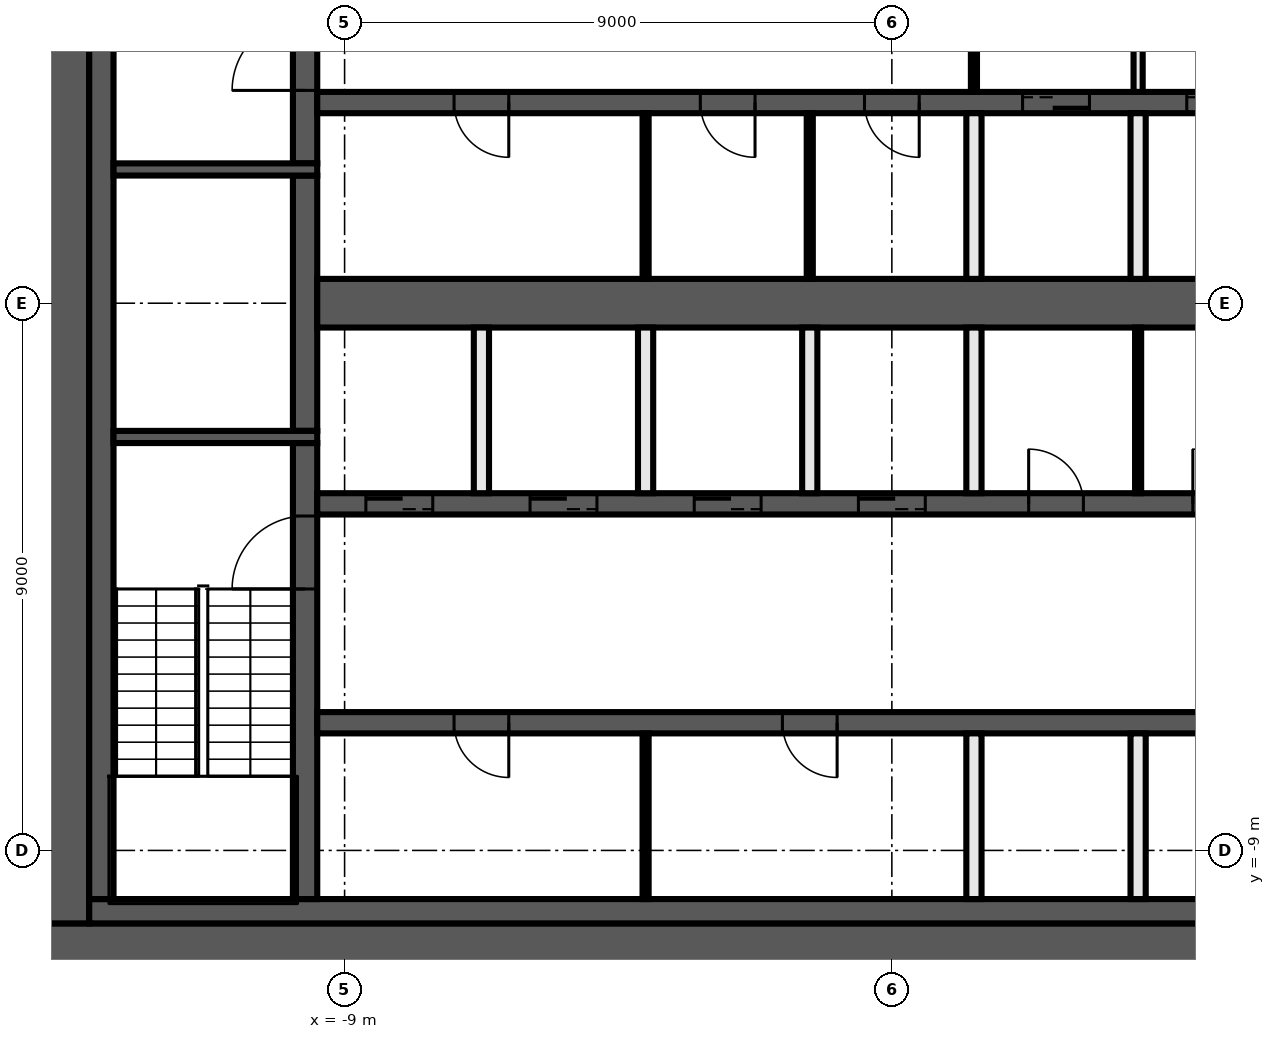
"""IFC4 building model, lengths in metres.
Left out: names, types, materials, properties, quantities, classifications, styles, units other than length and angle.
Written with IfcOpenShell. Run it as: python <this file> out.ifc"""

import sys

from ifc_helpers import new_model, si_unit, direction, frame, frame_2d, origin, place, context, subcontext, project, spatial, rectangle, extrude, element, fill, save


model = new_model("IFC4")
c1 = context("Model", 3, precision=1e-05, world=origin(), true_north=direction((0.0, 1.0)))
c2 = subcontext(c1, "Body", "Model", "MODEL_VIEW")
j1 = project(units=[si_unit("LENGTHUNIT", "METRE"), si_unit("PLANEANGLEUNIT", "RADIAN")], contexts=[c1])
p1 = place(None, origin())
s1 = spatial("IfcSite", under=j1, at=p1, CompositionType="ELEMENT")
p2 = place(p1, origin())
s2 = spatial("IfcBuilding", under=s1, at=p2, CompositionType="ELEMENT")
p3 = place(p2, frame((0.0, 0.0, 167.0)))
s3 = spatial("IfcBuildingStorey", under=s2, at=p3, CompositionType="ELEMENT", Elevation=167.0)
p4 = place(p3, frame((14.0, -10.6, 0.0), z_axis=(0.0, 0.0, 1.0), x_axis=(-1.0, 0.0, 0.0)))
e1 = element("IfcWall", 1, at=p4, inside=s3, PredefinedType="SHEAR", context=c2, shape_type="SweptSolid", body=[
    extrude(rectangle(XDim=28.0, YDim=0.8, at=frame_2d((14.0, 0.0))), origin(), (0.0, 0.0, 1.0), 3.82),
])
p5 = place(p4, frame((5.1, 0.0, 0.0)))
e2 = element("IfcOpeningElement", 2, at=p5, cuts=e1, PredefinedType="OPENING", context=c2, shape_type="SweptSolid", body=[
    extrude(rectangle(XDim=1.6, YDim=2.1, at=frame_2d((0.8, 1.05))), frame((0.0, 0.41, 0.0), z_axis=(0.0, -1.0, 0.0), x_axis=(1.0, 0.0, 0.0)), (0.0, 0.0, 1.0), 0.82),
])
p6 = place(p3, frame((-13.6, -10.2, 0.0), z_axis=(0.0, 0.0, 1.0), x_axis=(0.0, 1.0, 0.0)))
e3 = element("IfcWall", 3, at=p6, inside=s3, PredefinedType="SHEAR", context=c2, shape_type="SweptSolid", body=[
    extrude(rectangle(XDim=20.4, YDim=0.8, at=frame_2d((10.2, 0.0))), origin(), (0.0, 0.0, 1.0), 3.82),
])
p7 = place(p3, frame((6.9, -10.0, 0.0), z_axis=(0.0, 0.0, 1.0), x_axis=(-1.0, 0.0, 0.0)))
e4 = element("IfcWall", 4, at=p7, inside=s3, PredefinedType="SHEAR", context=c2, shape_type="SweptSolid", body=[
    extrude(rectangle(XDim=20.1, YDim=0.4, at=frame_2d((10.05, 0.0))), origin(), (0.0, 0.0, 1.0), 3.82),
])
p8 = place(p3, frame((-13.0, -9.8, 0.0), z_axis=(0.0, 0.0, 1.0), x_axis=(0.0, 1.0, 0.0)))
e5 = element("IfcWall", 5, at=p8, inside=s3, PredefinedType="SHEAR", context=c2, shape_type="SweptSolid", body=[
    extrude(rectangle(XDim=19.6, YDim=0.4, at=frame_2d((9.8, 0.0))), origin(), (0.0, 0.0, 1.0), 3.82),
])
p9 = place(p3, frame((-9.65, -9.8, 0.0), z_axis=(0.0, 0.0, 1.0), x_axis=(0.0, 1.0, 0.0)))
e6 = element("IfcWall", 6, at=p9, inside=s3, PredefinedType="SHEAR", context=c2, shape_type="SweptSolid", body=[
    extrude(rectangle(XDim=7.5, YDim=0.4, at=frame_2d((3.75, 0.0))), origin(), (0.0, 0.0, 1.0), 3.82),
])
p10 = place(p9, frame((5.1, 0.0, 0.0)))
e7 = element("IfcOpeningElement", 7, at=p10, cuts=e6, PredefinedType="OPENING", context=c2, shape_type="SweptSolid", body=[
    extrude(rectangle(XDim=1.2, YDim=2.1, at=frame_2d((0.6, 1.05))), frame((0.0, 0.21, 0.0), z_axis=(0.0, -1.0, 0.0), x_axis=(1.0, 0.0, 0.0)), (0.0, 0.0, 1.0), 0.42),
])
p11 = place(p3, frame((-9.65, -2.1, 0.0), z_axis=(0.0, 0.0, 1.0), x_axis=(0.0, 1.0, 0.0)))
e8 = element("IfcWall", 8, at=p11, inside=s3, PredefinedType="SHEAR", context=c2, shape_type="SweptSolid", body=[
    extrude(rectangle(XDim=4.2, YDim=0.4, at=frame_2d((2.1, 0.0))), origin(), (0.0, 0.0, 1.0), 3.82),
])
p12 = place(p3, frame((-9.65, 2.3, 0.0), z_axis=(0.0, 0.0, 1.0), x_axis=(0.0, 1.0, 0.0)))
e9 = element("IfcWall", 9, at=p12, inside=s3, PredefinedType="SHEAR", context=c2, shape_type="SweptSolid", body=[
    extrude(rectangle(XDim=7.5, YDim=0.4, at=frame_2d((3.75, 0.0))), origin(), (0.0, 0.0, 1.0), 3.82),
])
p13 = place(p12, frame((1.2, 0.0, 0.0)))
e10 = element("IfcOpeningElement", 10, at=p13, cuts=e9, PredefinedType="OPENING", context=c2, shape_type="SweptSolid", body=[
    extrude(rectangle(XDim=1.2, YDim=2.1, at=frame_2d((0.6, 1.05))), frame((0.0, 0.21, 0.0), z_axis=(0.0, -1.0, 0.0), x_axis=(1.0, 0.0, 0.0)), (0.0, 0.0, 1.0), 0.42),
])
for number, where, z_axis, x_axis in (
    (11, (-9.45, 2.2, 0.0), (0.0, 0.0, 1.0), (-1.0, 0.0, 0.0)),
    (12, (-9.45, -2.2, 0.0), (0.0, 0.0, 1.0), (-1.0, 0.0, 0.0)),
):
    element("IfcWall", number, at=place(p3, frame(where, z_axis=z_axis, x_axis=x_axis)), inside=s3, PredefinedType="SHEAR", context=c2, shape_type="SweptSolid", body=[
        extrude(rectangle(XDim=3.35, YDim=0.2, at=frame_2d((1.675, 0.0))), origin(), (0.0, 0.0, 1.0), 3.82),
    ])
p14 = place(p3, frame((9.45, 3.3, 0.0), z_axis=(0.0, 0.0, 1.0), x_axis=(-1.0, 0.0, 0.0)))
e13 = element("IfcWall", 13, at=p14, inside=s3, PredefinedType="SHEAR", context=c2, shape_type="SweptSolid", body=[
    extrude(rectangle(XDim=18.9, YDim=0.35, at=frame_2d((9.45, 0.0))), origin(), (0.0, 0.0, 1.0), 3.82),
])
p15 = place(p14, frame((6.2, 0.0, 0.0)))
e14 = element("IfcOpeningElement", 14, at=p15, cuts=e13, PredefinedType="OPENING", context=c2, shape_type="SweptSolid", body=[
    extrude(rectangle(XDim=1.1, YDim=2.1, at=frame_2d((0.55, 1.05))), frame((0.0, 0.185, 0.0), z_axis=(0.0, -1.0, 0.0), x_axis=(1.0, 0.0, 0.0)), (0.0, 0.0, 1.0), 0.37),
])
p16 = place(p14, frame((3.5, 0.0, 0.0)))
e15 = element("IfcOpeningElement", 15, at=p16, cuts=e13, PredefinedType="OPENING", context=c2, shape_type="SweptSolid", body=[
    extrude(rectangle(XDim=1.1, YDim=2.1, at=frame_2d((0.55, 1.05))), frame((0.0, 0.185, 0.0), z_axis=(0.0, -1.0, 0.0), x_axis=(1.0, 0.0, 0.0)), (0.0, 0.0, 1.0), 0.37),
])
p17 = place(p14, frame((0.9, 0.0, 0.0)))
e16 = element("IfcOpeningElement", 16, at=p17, cuts=e13, PredefinedType="OPENING", context=c2, shape_type="SweptSolid", body=[
    extrude(rectangle(XDim=0.9, YDim=2.1, at=frame_2d((0.45, 1.05))), frame((0.0, 0.185, 0.0), z_axis=(0.0, -1.0, 0.0), x_axis=(1.0, 0.0, 0.0)), (0.0, 0.0, 1.0), 0.37),
])
p18 = place(p14, frame((15.75, 0.0, 0.0)))
e17 = element("IfcOpeningElement", 17, at=p18, cuts=e13, PredefinedType="OPENING", context=c2, shape_type="SweptSolid", body=[
    extrude(rectangle(XDim=0.9, YDim=2.1, at=frame_2d((0.45, 1.05))), frame((0.0, 0.185, 0.0), z_axis=(0.0, -1.0, 0.0), x_axis=(1.0, 0.0, 0.0)), (0.0, 0.0, 1.0), 0.37),
])
p19 = place(p14, frame((11.7, 0.0, 0.0)))
e18 = element("IfcOpeningElement", 18, at=p19, cuts=e13, PredefinedType="OPENING", context=c2, shape_type="SweptSolid", body=[
    extrude(rectangle(XDim=0.9, YDim=2.1, at=frame_2d((0.45, 1.05))), frame((0.0, 0.185, 0.0), z_axis=(0.0, -1.0, 0.0), x_axis=(1.0, 0.0, 0.0)), (0.0, 0.0, 1.0), 0.37),
])
p20 = place(p14, frame((9.0, 0.0, 0.0)))
e19 = element("IfcOpeningElement", 19, at=p20, cuts=e13, PredefinedType="OPENING", context=c2, shape_type="SweptSolid", body=[
    extrude(rectangle(XDim=0.9, YDim=2.1, at=frame_2d((0.45, 1.05))), frame((0.0, 0.185, 0.0), z_axis=(0.0, -1.0, 0.0), x_axis=(1.0, 0.0, 0.0)), (0.0, 0.0, 1.0), 0.37),
])
p21 = place(p3, frame((-9.45, -3.3, 0.0), z_axis=(0.0, 0.0, 1.0), x_axis=(1.0, 0.0, 0.0)))
e20 = element("IfcWall", 20, at=p21, inside=s3, PredefinedType="SHEAR", context=c2, shape_type="SweptSolid", body=[
    extrude(rectangle(XDim=18.9, YDim=0.35, at=frame_2d((9.45, 0.0))), origin(), (0.0, 0.0, 1.0), 3.82),
])
p22 = place(p21, frame((0.8, 0.0, 0.0)))
e21 = element("IfcOpeningElement", 21, at=p22, cuts=e20, PredefinedType="OPENING", context=c2, shape_type="SweptSolid", body=[
    extrude(rectangle(XDim=1.1, YDim=2.1, at=frame_2d((0.55, 1.05))), frame((0.0, 0.185, 0.0), z_axis=(0.0, -1.0, 0.0), x_axis=(1.0, 0.0, 0.0)), (0.0, 0.0, 1.0), 0.37),
])
p23 = place(p21, frame((3.5, 0.0, 0.0)))
e22 = element("IfcOpeningElement", 22, at=p23, cuts=e20, PredefinedType="OPENING", context=c2, shape_type="SweptSolid", body=[
    extrude(rectangle(XDim=1.1, YDim=2.1, at=frame_2d((0.55, 1.05))), frame((0.0, 0.185, 0.0), z_axis=(0.0, -1.0, 0.0), x_axis=(1.0, 0.0, 0.0)), (0.0, 0.0, 1.0), 0.37),
])
p24 = place(p21, frame((6.2, 0.0, 0.0)))
e23 = element("IfcOpeningElement", 23, at=p24, cuts=e20, PredefinedType="OPENING", context=c2, shape_type="SweptSolid", body=[
    extrude(rectangle(XDim=1.1, YDim=2.1, at=frame_2d((0.55, 1.05))), frame((0.0, 0.185, 0.0), z_axis=(0.0, -1.0, 0.0), x_axis=(1.0, 0.0, 0.0)), (0.0, 0.0, 1.0), 0.37),
])
p25 = place(p21, frame((8.9, 0.0, 0.0)))
e24 = element("IfcOpeningElement", 24, at=p25, cuts=e20, PredefinedType="OPENING", context=c2, shape_type="SweptSolid", body=[
    extrude(rectangle(XDim=1.1, YDim=2.1, at=frame_2d((0.55, 1.05))), frame((0.0, 0.185, 0.0), z_axis=(0.0, -1.0, 0.0), x_axis=(1.0, 0.0, 0.0)), (0.0, 0.0, 1.0), 0.37),
])
p26 = place(p21, frame((17.0, 0.0, 0.0)))
e25 = element("IfcOpeningElement", 25, at=p26, cuts=e20, PredefinedType="OPENING", context=c2, shape_type="SweptSolid", body=[
    extrude(rectangle(XDim=1.1, YDim=2.1, at=frame_2d((0.55, 1.05))), frame((0.0, 0.185, 0.0), z_axis=(0.0, -1.0, 0.0), x_axis=(1.0, 0.0, 0.0)), (0.0, 0.0, 1.0), 0.37),
])
p27 = place(p21, frame((11.7, 0.0, 0.0)))
e26 = element("IfcOpeningElement", 26, at=p27, cuts=e20, PredefinedType="OPENING", context=c2, shape_type="SweptSolid", body=[
    extrude(rectangle(XDim=0.9, YDim=2.1, at=frame_2d((0.45, 1.05))), frame((0.0, 0.185, 0.0), z_axis=(0.0, -1.0, 0.0), x_axis=(1.0, 0.0, 0.0)), (0.0, 0.0, 1.0), 0.37),
])
p28 = place(p21, frame((14.4, 0.0, 0.0)))
e27 = element("IfcOpeningElement", 27, at=p28, cuts=e20, PredefinedType="OPENING", context=c2, shape_type="SweptSolid", body=[
    extrude(rectangle(XDim=0.9, YDim=2.1, at=frame_2d((0.45, 1.05))), frame((0.0, 0.185, 0.0), z_axis=(0.0, -1.0, 0.0), x_axis=(1.0, 0.0, 0.0)), (0.0, 0.0, 1.0), 0.37),
])
p29 = place(p3, frame((9.45, -6.9, 0.0), z_axis=(0.0, 0.0, 1.0), x_axis=(-1.0, 0.0, 0.0)))
e28 = element("IfcWall", 28, at=p29, inside=s3, PredefinedType="SHEAR", context=c2, shape_type="SweptSolid", body=[
    extrude(rectangle(XDim=18.9, YDim=0.35, at=frame_2d((9.45, 0.0))), origin(), (0.0, 0.0, 1.0), 3.82),
])
p30 = place(p29, frame((0.75, 0.0, 0.0)))
e29 = element("IfcOpeningElement", 29, at=p30, cuts=e28, PredefinedType="OPENING", context=c2, shape_type="SweptSolid", body=[
    extrude(rectangle(XDim=1.2, YDim=2.1, at=frame_2d((0.6, 1.05))), frame((0.0, 0.185, 0.0), z_axis=(0.0, -1.0, 0.0), x_axis=(1.0, 0.0, 0.0)), (0.0, 0.0, 1.0), 0.37),
])
p31 = place(p29, frame((15.75, 0.0, 0.0)))
e30 = element("IfcOpeningElement", 30, at=p31, cuts=e28, PredefinedType="OPENING", context=c2, shape_type="SweptSolid", body=[
    extrude(rectangle(XDim=0.9, YDim=2.1, at=frame_2d((0.45, 1.05))), frame((0.0, 0.185, 0.0), z_axis=(0.0, -1.0, 0.0), x_axis=(1.0, 0.0, 0.0)), (0.0, 0.0, 1.0), 0.37),
])
p32 = place(p29, frame((10.35, 0.0, 0.0)))
e31 = element("IfcOpeningElement", 31, at=p32, cuts=e28, PredefinedType="OPENING", context=c2, shape_type="SweptSolid", body=[
    extrude(rectangle(XDim=0.9, YDim=2.1, at=frame_2d((0.45, 1.05))), frame((0.0, 0.185, 0.0), z_axis=(0.0, -1.0, 0.0), x_axis=(1.0, 0.0, 0.0)), (0.0, 0.0, 1.0), 0.37),
])
p33 = place(p3, frame((-9.45, 0.0, 0.0), z_axis=(0.0, 0.0, 1.0), x_axis=(1.0, 0.0, 0.0)))
e32 = element("IfcWall", 32, at=p33, inside=s3, PredefinedType="SHEAR", context=c2, shape_type="SweptSolid", body=[
    extrude(rectangle(XDim=18.9, YDim=0.8, at=frame_2d((9.45, 0.0))), origin(), (0.0, 0.0, 1.0), 3.82),
])
p34 = place(p3, frame((4.05, 6.725, 0.0), z_axis=(0.0, 0.0, 1.0), x_axis=(0.0, -1.0, 0.0)))
e33 = element("IfcWall", 33, at=p34, inside=s3, PredefinedType="PARTITIONING", context=c2, shape_type="SweptSolid", body=[
    extrude(rectangle(XDim=3.25, YDim=0.15, at=frame_2d((1.625, 0.0))), origin(), (0.0, 0.0, 1.0), 3.82),
])
p35 = place(p34, frame((1.025, 0.0, 0.0)))
e34 = element("IfcOpeningElement", 34, at=p35, cuts=e33, PredefinedType="OPENING", context=c2, shape_type="SweptSolid", body=[
    extrude(rectangle(XDim=1.2, YDim=2.1, at=frame_2d((0.6, 1.05))), frame((0.0, 0.085, 0.0), z_axis=(0.0, -1.0, 0.0), x_axis=(1.0, 0.0, 0.0)), (0.0, 0.0, 1.0), 0.17),
])
p36 = place(p3, frame((4.05, -3.125, 0.0), z_axis=(0.0, 0.0, 1.0), x_axis=(0.0, 1.0, 0.0)))
e35 = element("IfcWall", 35, at=p36, inside=s3, PredefinedType="PARTITIONING", context=c2, shape_type="SweptSolid", body=[
    extrude(rectangle(XDim=2.725, YDim=0.1, at=frame_2d((1.363, 0.0))), origin(), (0.0, 0.0, 1.0), 3.82),
])
for number, where, z_axis, x_axis in (
    (36, (4.05, -9.8, 0.0), (0.0, 0.0, 1.0), (0.0, 1.0, 0.0)),
    (37, (4.05, 0.4, 0.0), (0.0, 0.0, 1.0), (0.0, 1.0, 0.0)),
):
    element("IfcWall", number, at=place(p3, frame(where, z_axis=z_axis, x_axis=x_axis)), inside=s3, PredefinedType="SOLIDWALL", context=c2, shape_type="SweptSolid", body=[
        extrude(rectangle(XDim=2.725, YDim=0.25, at=frame_2d((1.363, 0.0))), origin(), (0.0, 0.0, 1.0), 3.82),
    ])
p37 = place(p3, frame((1.35, 6.725, 0.0), z_axis=(0.0, 0.0, 1.0), x_axis=(0.0, -1.0, 0.0)))
e38 = element("IfcWall", 38, at=p37, inside=s3, PredefinedType="PARTITIONING", context=c2, shape_type="SweptSolid", body=[
    extrude(rectangle(XDim=3.25, YDim=0.1, at=frame_2d((1.625, 0.0))), origin(), (0.0, 0.0, 1.0), 3.82),
])
p38 = place(p37, frame((1.025, 0.0, 0.0)))
e39 = element("IfcOpeningElement", 39, at=p38, cuts=e38, PredefinedType="OPENING", context=c2, shape_type="SweptSolid", body=[
    extrude(rectangle(XDim=1.2, YDim=2.1, at=frame_2d((0.6, 1.05))), frame((0.0, 0.06, 0.0), z_axis=(0.0, -1.0, 0.0), x_axis=(1.0, 0.0, 0.0)), (0.0, 0.0, 1.0), 0.12),
])
for number, where, z_axis, x_axis in (
    (40, (1.35, -9.8, 0.0), (0.0, 0.0, 1.0), (0.0, 1.0, 0.0)),
    (41, (1.35, -3.125, 0.0), (0.0, 0.0, 1.0), (0.0, 1.0, 0.0)),
    (42, (1.35, 0.4, 0.0), (0.0, 0.0, 1.0), (0.0, 1.0, 0.0)),
):
    element("IfcWall", number, at=place(p3, frame(where, z_axis=z_axis, x_axis=x_axis)), inside=s3, PredefinedType="SOLIDWALL", context=c2, shape_type="SweptSolid", body=[
        extrude(rectangle(XDim=2.725, YDim=0.25, at=frame_2d((1.363, 0.0))), origin(), (0.0, 0.0, 1.0), 3.82),
    ])
p39 = place(p3, frame((-1.35, 0.4, 0.0), z_axis=(0.0, 0.0, 1.0), x_axis=(0.0, 1.0, 0.0)))
e43 = element("IfcWall", 43, at=p39, inside=s3, PredefinedType="PARTITIONING", context=c2, shape_type="SweptSolid", body=[
    extrude(rectangle(XDim=2.725, YDim=0.1, at=frame_2d((1.363, 0.0))), origin(), (0.0, 0.0, 1.0), 3.82),
])
p40 = place(p3, frame((-1.35, -3.125, 0.0), z_axis=(0.0, 0.0, 1.0), x_axis=(0.0, 1.0, 0.0)))
e44 = element("IfcWall", 44, at=p40, inside=s3, PredefinedType="SOLIDWALL", context=c2, shape_type="SweptSolid", body=[
    extrude(rectangle(XDim=2.725, YDim=0.25, at=frame_2d((1.363, 0.0))), origin(), (0.0, 0.0, 1.0), 3.82),
])
for number, where, z_axis, x_axis in (
    (45, (-4.05, -9.8, 0.0), (0.0, 0.0, 1.0), (0.0, 1.0, 0.0)),
    (46, (-4.05, 0.4, 0.0), (0.0, 0.0, 1.0), (0.0, 1.0, 0.0)),
):
    element("IfcWall", number, at=place(p3, frame(where, z_axis=z_axis, x_axis=x_axis)), inside=s3, PredefinedType="PARTITIONING", context=c2, shape_type="SweptSolid", body=[
        extrude(rectangle(XDim=2.725, YDim=0.1, at=frame_2d((1.363, 0.0))), origin(), (0.0, 0.0, 1.0), 3.82),
    ])
for number, where, z_axis, x_axis in (
    (47, (-4.05, -3.125, 0.0), (0.0, 0.0, 1.0), (0.0, 1.0, 0.0)),
    (48, (-6.75, -3.125, 0.0), (0.0, 0.0, 1.0), (0.0, 1.0, 0.0)),
):
    element("IfcWall", number, at=place(p3, frame(where, z_axis=z_axis, x_axis=x_axis)), inside=s3, PredefinedType="SOLIDWALL", context=c2, shape_type="SweptSolid", body=[
        extrude(rectangle(XDim=2.725, YDim=0.25, at=frame_2d((1.363, 0.0))), origin(), (0.0, 0.0, 1.0), 3.82),
    ])
p41 = place(p15, origin())
e49 = element("IfcDoor", 49, at=p41, inside=s3, OperationType="DOUBLE_DOOR_SLIDING", PredefinedType="DOOR", context=c2, shape_type="SweptSolid", body=[
    extrude(rectangle(XDim=1.1, YDim=2.1, at=frame_2d((0.55, 1.05))), frame((0.0, 0.025, 0.0), z_axis=(0.0, -1.0, 0.0), x_axis=(1.0, 0.0, 0.0)), (0.0, 0.0, 1.0), 0.05),
])
fill(e14, e49)
p42 = place(p16, origin())
e50 = element("IfcDoor", 50, at=p42, inside=s3, OperationType="DOUBLE_DOOR_SLIDING", PredefinedType="DOOR", context=c2, shape_type="SweptSolid", body=[
    extrude(rectangle(XDim=1.1, YDim=2.1, at=frame_2d((0.55, 1.05))), frame((0.0, 0.025, 0.0), z_axis=(0.0, -1.0, 0.0), x_axis=(1.0, 0.0, 0.0)), (0.0, 0.0, 1.0), 0.05),
])
fill(e15, e50)
p43 = place(p22, origin())
e51 = element("IfcDoor", 51, at=p43, inside=s3, OperationType="DOUBLE_DOOR_SLIDING", PredefinedType="DOOR", context=c2, shape_type="SweptSolid", body=[
    extrude(rectangle(XDim=1.1, YDim=2.1, at=frame_2d((0.55, 1.05))), frame((0.0, 0.025, 0.0), z_axis=(0.0, -1.0, 0.0), x_axis=(1.0, 0.0, 0.0)), (0.0, 0.0, 1.0), 0.05),
])
fill(e21, e51)
p44 = place(p23, origin())
e52 = element("IfcDoor", 52, at=p44, inside=s3, OperationType="DOUBLE_DOOR_SLIDING", PredefinedType="DOOR", context=c2, shape_type="SweptSolid", body=[
    extrude(rectangle(XDim=1.1, YDim=2.1, at=frame_2d((0.55, 1.05))), frame((0.0, 0.025, 0.0), z_axis=(0.0, -1.0, 0.0), x_axis=(1.0, 0.0, 0.0)), (0.0, 0.0, 1.0), 0.05),
])
fill(e22, e52)
p45 = place(p24, origin())
e53 = element("IfcDoor", 53, at=p45, inside=s3, OperationType="DOUBLE_DOOR_SLIDING", PredefinedType="DOOR", context=c2, shape_type="SweptSolid", body=[
    extrude(rectangle(XDim=1.1, YDim=2.1, at=frame_2d((0.55, 1.05))), frame((0.0, 0.025, 0.0), z_axis=(0.0, -1.0, 0.0), x_axis=(1.0, 0.0, 0.0)), (0.0, 0.0, 1.0), 0.05),
])
fill(e23, e53)
p46 = place(p25, origin())
e54 = element("IfcDoor", 54, at=p46, inside=s3, OperationType="DOUBLE_DOOR_SLIDING", PredefinedType="DOOR", context=c2, shape_type="SweptSolid", body=[
    extrude(rectangle(XDim=1.1, YDim=2.1, at=frame_2d((0.55, 1.05))), frame((0.0, 0.025, 0.0), z_axis=(0.0, -1.0, 0.0), x_axis=(1.0, 0.0, 0.0)), (0.0, 0.0, 1.0), 0.05),
])
fill(e24, e54)
p47 = place(p18, origin())
e55 = element("IfcDoor", 55, at=p47, inside=s3, OperationType="SINGLE_SWING_LEFT", PredefinedType="DOOR", context=c2, shape_type="SweptSolid", body=[
    extrude(rectangle(XDim=0.9, YDim=2.1, at=frame_2d((0.45, 1.05))), frame((0.0, 0.025, 0.0), z_axis=(0.0, -1.0, 0.0), x_axis=(1.0, 0.0, 0.0)), (0.0, 0.0, 1.0), 0.05),
])
fill(e17, e55)
p48 = place(p19, origin())
e56 = element("IfcDoor", 56, at=p48, inside=s3, OperationType="SINGLE_SWING_RIGHT", PredefinedType="DOOR", context=c2, shape_type="SweptSolid", body=[
    extrude(rectangle(XDim=0.9, YDim=2.1, at=frame_2d((0.45, 1.05))), frame((0.0, 0.025, 0.0), z_axis=(0.0, -1.0, 0.0), x_axis=(1.0, 0.0, 0.0)), (0.0, 0.0, 1.0), 0.05),
])
fill(e18, e56)
p49 = place(p20, origin())
e57 = element("IfcDoor", 57, at=p49, inside=s3, OperationType="SINGLE_SWING_LEFT", PredefinedType="DOOR", context=c2, shape_type="SweptSolid", body=[
    extrude(rectangle(XDim=0.9, YDim=2.1, at=frame_2d((0.45, 1.05))), frame((0.0, 0.025, 0.0), z_axis=(0.0, -1.0, 0.0), x_axis=(1.0, 0.0, 0.0)), (0.0, 0.0, 1.0), 0.05),
])
fill(e19, e57)
p50 = place(p27, origin())
e58 = element("IfcDoor", 58, at=p50, inside=s3, OperationType="SINGLE_SWING_RIGHT", PredefinedType="DOOR", context=c2, shape_type="SweptSolid", body=[
    extrude(rectangle(XDim=0.9, YDim=2.1, at=frame_2d((0.45, 1.05))), frame((0.0, 0.025, 0.0), z_axis=(0.0, -1.0, 0.0), x_axis=(1.0, 0.0, 0.0)), (0.0, 0.0, 1.0), 0.05),
])
fill(e26, e58)
p51 = place(p28, origin())
e59 = element("IfcDoor", 59, at=p51, inside=s3, OperationType="SINGLE_SWING_LEFT", PredefinedType="DOOR", context=c2, shape_type="SweptSolid", body=[
    extrude(rectangle(XDim=0.9, YDim=2.1, at=frame_2d((0.45, 1.05))), frame((0.0, 0.025, 0.0), z_axis=(0.0, -1.0, 0.0), x_axis=(1.0, 0.0, 0.0)), (0.0, 0.0, 1.0), 0.05),
])
fill(e27, e59)
p52 = place(p31, origin())
e60 = element("IfcDoor", 60, at=p52, inside=s3, OperationType="SINGLE_SWING_RIGHT", PredefinedType="DOOR", context=c2, shape_type="SweptSolid", body=[
    extrude(rectangle(XDim=0.9, YDim=2.1, at=frame_2d((0.45, 1.05))), frame((0.0, 0.025, 0.0), z_axis=(0.0, -1.0, 0.0), x_axis=(1.0, 0.0, 0.0)), (0.0, 0.0, 1.0), 0.05),
])
fill(e30, e60)
p53 = place(p32, origin())
e61 = element("IfcDoor", 61, at=p53, inside=s3, OperationType="SINGLE_SWING_LEFT", PredefinedType="DOOR", context=c2, shape_type="SweptSolid", body=[
    extrude(rectangle(XDim=0.9, YDim=2.1, at=frame_2d((0.45, 1.05))), frame((0.0, 0.025, 0.0), z_axis=(0.0, -1.0, 0.0), x_axis=(1.0, 0.0, 0.0)), (0.0, 0.0, 1.0), 0.05),
])
fill(e31, e61)
p54 = place(p13, origin())
e62 = element("IfcDoor", 62, at=p54, inside=s3, OperationType="SINGLE_SWING_RIGHT", PredefinedType="DOOR", context=c2, shape_type="SweptSolid", body=[
    extrude(rectangle(XDim=1.2, YDim=2.1, at=frame_2d((0.6, 1.05))), frame((0.0, 0.025, 0.0), z_axis=(0.0, -1.0, 0.0), x_axis=(1.0, 0.0, 0.0)), (0.0, 0.0, 1.0), 0.05),
])
fill(e10, e62)
p55 = place(p10, origin())
e63 = element("IfcDoor", 63, at=p55, inside=s3, OperationType="SINGLE_SWING_LEFT", PredefinedType="DOOR", context=c2, shape_type="SweptSolid", body=[
    extrude(rectangle(XDim=1.2, YDim=2.1, at=frame_2d((0.6, 1.05))), frame((0.0, 0.025, 0.0), z_axis=(0.0, -1.0, 0.0), x_axis=(1.0, 0.0, 0.0)), (0.0, 0.0, 1.0), 0.05),
])
fill(e7, e63)
save(model, sys.argv[1])
